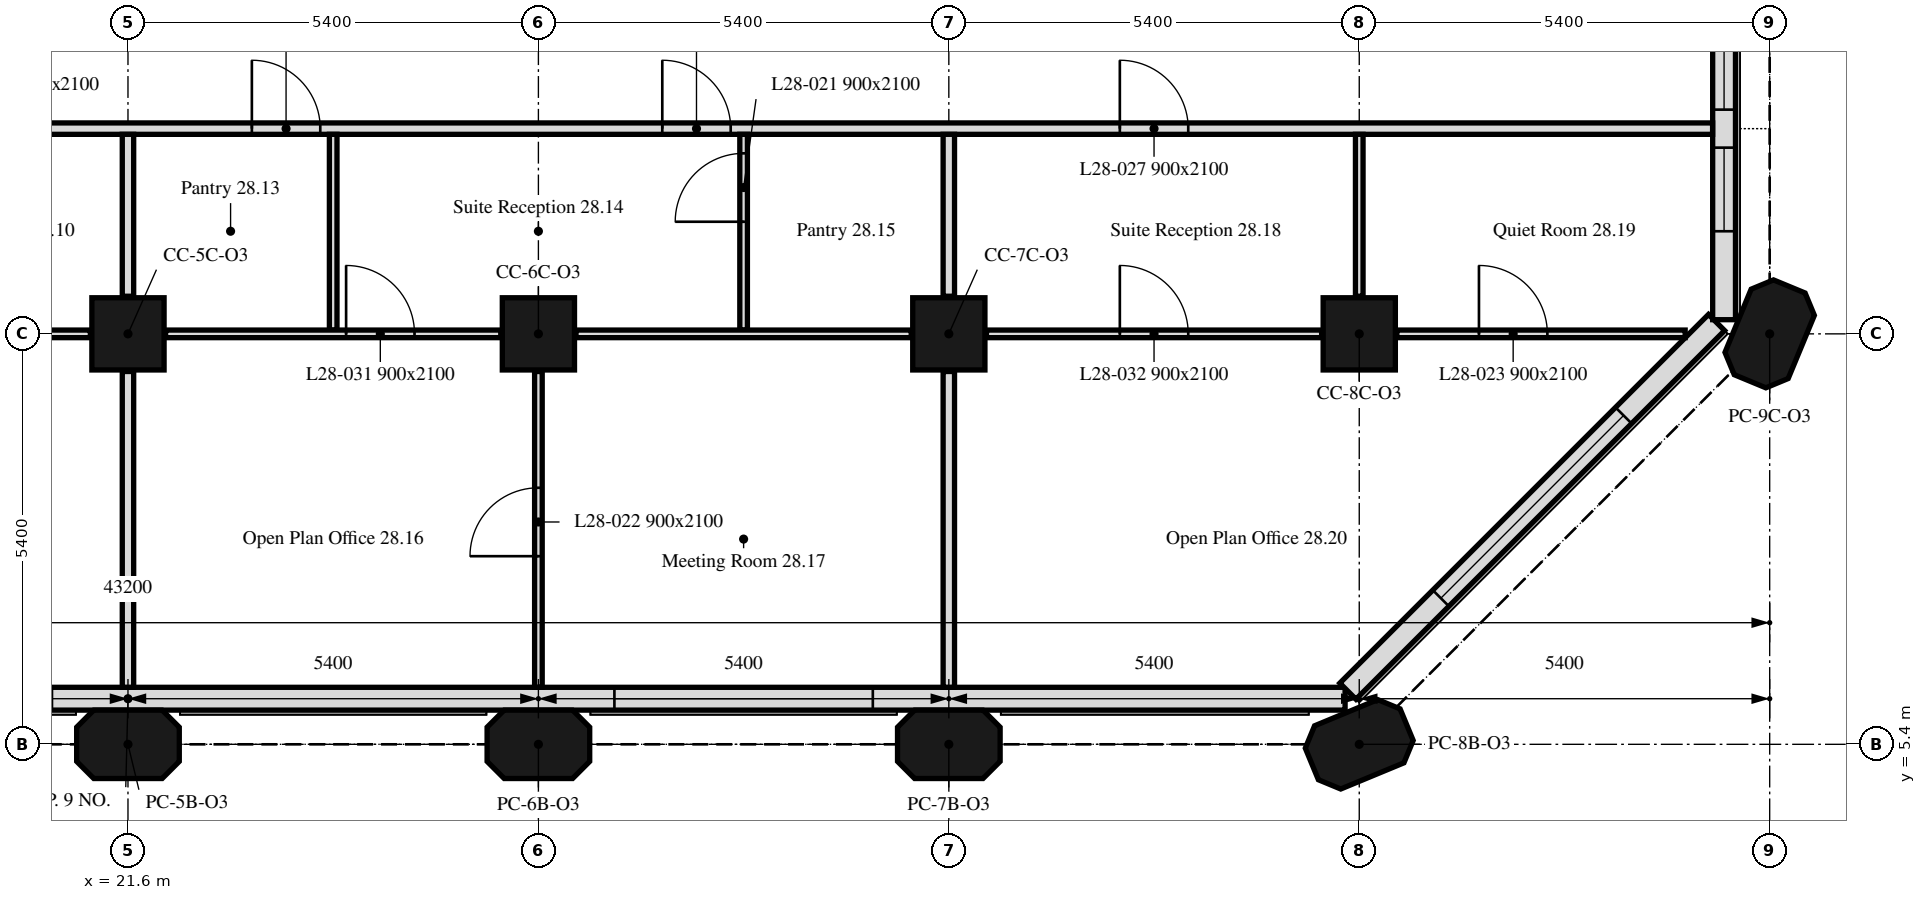
"""IFC4 building model, lengths in metres.
Left out: names, types, materials, properties, quantities, classifications, styles, units other than length and angle.
Written with IfcOpenShell. Run it as: python <this file> out.ifc"""

import sys

from ifc_helpers import new_model, si_unit, direction, frame, frame_2d, origin, origin_2d, place, context, subcontext, project, spatial, polyline, rectangle, outline, extrude, element, fill, save


model = new_model("IFC4")
c1 = context("Model", 3, precision=1e-05, world=origin(), true_north=direction((0.0, 1.0)))
c2 = subcontext(c1, "Body", "Model", "MODEL_VIEW")
j1 = project(units=[si_unit("LENGTHUNIT", "METRE"), si_unit("PLANEANGLEUNIT", "RADIAN")], contexts=[c1])
p1 = place(None, origin())
s1 = spatial("IfcSite", under=j1, at=p1, CompositionType="ELEMENT")
p2 = place(p1, origin())
s2 = spatial("IfcBuilding", under=s1, at=p2, CompositionType="ELEMENT")
p3 = place(p2, frame((0.0, 0.0, 118.2)))
s3 = spatial("IfcBuildingStorey", under=s2, at=p3, CompositionType="ELEMENT", Elevation=118.2)
for number, where, z_axis, x_axis in (
    (1, (21.6, 5.4, 0.0), (0.0, 0.0, 1.0), (1.0, 0.0, 0.0)),
    (2, (27.0, 5.4, 0.0), (0.0, 0.0, 1.0), (1.0, 0.0, 0.0)),
    (3, (32.4, 5.4, 0.0), (0.0, 0.0, 1.0), (1.0, 0.0, 0.0)),
    (4, (37.8, 5.4, 0.0), (0.0, 0.0, 1.0), (0.924, 0.383, 0.0)),
):
    element("IfcColumn", number, at=place(p3, frame(where, z_axis=z_axis, x_axis=x_axis)), inside=s3, PredefinedType="COLUMN", context=c2, shape_type="SweptSolid", body=[
        extrude(outline(polyline([(-0.45, -0.45), (0.45, -0.45), (0.675, -0.225), (0.675, 0.225), (0.45, 0.45), (-0.45, 0.45), (-0.675, 0.225), (-0.675, -0.225), (-0.45, -0.45)])), origin(), (0.0, 0.0, 1.0), 3.5),
    ])
for number, where, z_axis, x_axis in (
    (5, (21.6, 10.8, 0.0), (0.0, 0.0, 1.0), (1.0, 0.0, 0.0)),
    (6, (27.0, 10.8, 0.0), (0.0, 0.0, 1.0), (1.0, 0.0, 0.0)),
    (7, (32.4, 10.8, 0.0), (0.0, 0.0, 1.0), (1.0, 0.0, 0.0)),
    (8, (37.8, 10.8, 0.0), (0.0, 0.0, 1.0), (1.0, 0.0, 0.0)),
):
    element("IfcColumn", number, at=place(p3, frame(where, z_axis=z_axis, x_axis=x_axis)), inside=s3, PredefinedType="COLUMN", context=c2, shape_type="SweptSolid", body=[
        extrude(rectangle(XDim=0.95, YDim=0.95, at=origin_2d()), origin(), (0.0, 0.0, 1.0), 3.5),
    ])
p4 = place(p3, frame((43.2, 10.8, 0.0), z_axis=(0.0, 0.0, 1.0), x_axis=(0.382683432365, 0.923879532511, 0.0)))
e9 = element("IfcColumn", 9, at=p4, inside=s3, PredefinedType="COLUMN", context=c2, shape_type="SweptSolid", body=[
    extrude(outline(polyline([(-0.45, -0.45), (0.45, -0.45), (0.675, -0.225), (0.675, 0.225), (0.45, 0.45), (-0.45, 0.45), (-0.675, 0.225), (-0.675, -0.225), (-0.45, -0.45)])), origin(), (0.0, 0.0, 1.0), 3.5),
])
p5 = place(p3, frame((5.586, 6.0, 0.0), z_axis=(0.0, 0.0, 1.0), x_axis=(1.0, 0.0, 0.0)))
e10 = element("IfcWall", 10, at=p5, inside=s3, PredefinedType="SOLIDWALL", context=c2, shape_type="SweptSolid", body=[
    extrude(rectangle(XDim=32.027, YDim=0.3, at=frame_2d((16.014, 0.0))), origin(), (0.0, 0.0, 1.0), 3.5),
])
p6 = place(p5, frame((0.814, 0.0, 0.9)))
e11 = element("IfcOpeningElement", 11, at=p6, cuts=e10, PredefinedType="OPENING", context=c2, shape_type="SweptSolid", body=[
    extrude(rectangle(XDim=3.4, YDim=1.7, at=frame_2d((1.7, 0.85))), frame((0.0, 0.16, 0.0), z_axis=(0.0, -1.0, 0.0), x_axis=(1.0, 0.0, 0.0)), (0.0, 0.0, 1.0), 0.32),
])
p7 = place(p5, frame((11.614, 0.0, 0.9)))
e12 = element("IfcOpeningElement", 12, at=p7, cuts=e10, PredefinedType="OPENING", context=c2, shape_type="SweptSolid", body=[
    extrude(rectangle(XDim=3.4, YDim=1.7, at=frame_2d((1.7, 0.85))), frame((0.0, 0.16, 0.0), z_axis=(0.0, -1.0, 0.0), x_axis=(1.0, 0.0, 0.0)), (0.0, 0.0, 1.0), 0.32),
])
p8 = place(p5, frame((22.414, 0.0, 0.9)))
e13 = element("IfcOpeningElement", 13, at=p8, cuts=e10, PredefinedType="OPENING", context=c2, shape_type="SweptSolid", body=[
    extrude(rectangle(XDim=3.4, YDim=1.7, at=frame_2d((1.7, 0.85))), frame((0.0, 0.16, 0.0), z_axis=(0.0, -1.0, 0.0), x_axis=(1.0, 0.0, 0.0)), (0.0, 0.0, 1.0), 0.32),
])
p9 = place(p3, frame((37.65, 6.099, 0.0), z_axis=(0.0, 0.0, 1.0), x_axis=(0.707106781187, 0.707106781187, 0.0)))
e14 = element("IfcWall", 14, at=p9, inside=s3, PredefinedType="SOLIDWALL", context=c2, shape_type="SweptSolid", body=[
    extrude(rectangle(XDim=6.86, YDim=0.3, at=frame_2d((3.43, 0.0))), origin(), (0.0, 0.0, 1.0), 3.5),
])
p10 = place(p9, frame((1.73, 0.0, 0.9)))
e15 = element("IfcOpeningElement", 15, at=p10, cuts=e14, PredefinedType="OPENING", context=c2, shape_type="SweptSolid", body=[
    extrude(rectangle(XDim=3.4, YDim=1.7, at=frame_2d((1.7, 0.85))), frame((0.0, 0.16, 0.0), z_axis=(0.0, -1.0, 0.0), x_axis=(1.0, 0.0, 0.0)), (0.0, 0.0, 1.0), 0.32),
])
p11 = place(p3, frame((42.6, 10.986, 0.0), z_axis=(0.0, 0.0, 1.0), x_axis=(0.0, 1.0, 0.0)))
e16 = element("IfcWall", 16, at=p11, inside=s3, PredefinedType="SOLIDWALL", context=c2, shape_type="SweptSolid", body=[
    extrude(rectangle(XDim=5.214, YDim=0.3, at=frame_2d((2.607, 0.0))), origin(), (0.0, 0.0, 1.0), 3.5),
])
p12 = place(p11, frame((1.164, 0.0, 0.9)))
e17 = element("IfcOpeningElement", 17, at=p12, cuts=e16, PredefinedType="OPENING", context=c2, shape_type="SweptSolid", body=[
    extrude(rectangle(XDim=1.1, YDim=1.7, at=frame_2d((0.55, 0.85))), frame((0.0, 0.16, 0.0), z_axis=(0.0, -1.0, 0.0), x_axis=(1.0, 0.0, 0.0)), (0.0, 0.0, 1.0), 0.32),
])
p13 = place(p11, frame((2.764, 0.0, 0.9)))
e18 = element("IfcOpeningElement", 18, at=p13, cuts=e16, PredefinedType="OPENING", context=c2, shape_type="SweptSolid", body=[
    extrude(rectangle(XDim=1.1, YDim=1.7, at=frame_2d((0.55, 0.85))), frame((0.0, 0.16, 0.0), z_axis=(0.0, -1.0, 0.0), x_axis=(1.0, 0.0, 0.0)), (0.0, 0.0, 1.0), 0.32),
])
p14 = place(p3, frame((0.751, 13.5, 0.0), z_axis=(0.0, 0.0, 1.0), x_axis=(1.0, 0.0, 0.0)))
e19 = element("IfcWall", 19, at=p14, inside=s3, PredefinedType="PARTITIONING", context=c2, shape_type="SweptSolid", body=[
    extrude(rectangle(XDim=41.698, YDim=0.15, at=frame_2d((20.849, 0.0))), origin(), (0.0, 0.0, 1.0), 3.5),
])
p15 = place(p14, frame((0.879, 0.0, 0.0)))
e20 = element("IfcOpeningElement", 20, at=p15, cuts=e19, PredefinedType="OPENING", context=c2, shape_type="SweptSolid", body=[
    extrude(rectangle(XDim=0.9, YDim=2.1, at=frame_2d((0.45, 1.05))), frame((0.0, 0.075, 0.0), z_axis=(0.0, -1.0, 0.0), x_axis=(1.0, 0.0, 0.0)), (0.0, 0.0, 1.0), 0.15),
])
p16 = place(p14, frame((7.519, 0.0, 0.0)))
e21 = element("IfcOpeningElement", 21, at=p16, cuts=e19, PredefinedType="OPENING", context=c2, shape_type="SweptSolid", body=[
    extrude(rectangle(XDim=0.9, YDim=2.1, at=frame_2d((0.45, 1.05))), frame((0.0, 0.075, 0.0), z_axis=(0.0, -1.0, 0.0), x_axis=(1.0, 0.0, 0.0)), (0.0, 0.0, 1.0), 0.15),
])
p17 = place(p14, frame((11.679, 0.0, 0.0)))
e22 = element("IfcOpeningElement", 22, at=p17, cuts=e19, PredefinedType="OPENING", context=c2, shape_type="SweptSolid", body=[
    extrude(rectangle(XDim=0.9, YDim=2.1, at=frame_2d((0.45, 1.05))), frame((0.0, 0.075, 0.0), z_axis=(0.0, -1.0, 0.0), x_axis=(1.0, 0.0, 0.0)), (0.0, 0.0, 1.0), 0.15),
])
p18 = place(p14, frame((22.479, 0.0, 0.0)))
e23 = element("IfcOpeningElement", 23, at=p18, cuts=e19, PredefinedType="OPENING", context=c2, shape_type="SweptSolid", body=[
    extrude(rectangle(XDim=0.9, YDim=2.1, at=frame_2d((0.45, 1.05))), frame((0.0, 0.075, 0.0), z_axis=(0.0, -1.0, 0.0), x_axis=(1.0, 0.0, 0.0)), (0.0, 0.0, 1.0), 0.15),
])
p19 = place(p14, frame((33.899, 0.0, 0.0)))
e24 = element("IfcOpeningElement", 24, at=p19, cuts=e19, PredefinedType="OPENING", context=c2, shape_type="SweptSolid", body=[
    extrude(rectangle(XDim=0.9, YDim=2.1, at=frame_2d((0.45, 1.05))), frame((0.0, 0.075, 0.0), z_axis=(0.0, -1.0, 0.0), x_axis=(1.0, 0.0, 0.0)), (0.0, 0.0, 1.0), 0.15),
])
p20 = place(p14, frame((17.079, 0.0, 0.0)))
e25 = element("IfcOpeningElement", 25, at=p20, cuts=e19, PredefinedType="OPENING", context=c2, shape_type="SweptSolid", body=[
    extrude(rectangle(XDim=0.9, YDim=2.1, at=frame_2d((0.45, 1.05))), frame((0.0, 0.075, 0.0), z_axis=(0.0, -1.0, 0.0), x_axis=(1.0, 0.0, 0.0)), (0.0, 0.0, 1.0), 0.15),
])
p21 = place(p14, frame((27.879, 0.0, 0.0)))
e26 = element("IfcOpeningElement", 26, at=p21, cuts=e19, PredefinedType="OPENING", context=c2, shape_type="SweptSolid", body=[
    extrude(rectangle(XDim=0.9, YDim=2.1, at=frame_2d((0.45, 1.05))), frame((0.0, 0.075, 0.0), z_axis=(0.0, -1.0, 0.0), x_axis=(1.0, 0.0, 0.0)), (0.0, 0.0, 1.0), 0.15),
])
p22 = place(p3, frame((16.695, 10.8, 0.0), z_axis=(0.0, 0.0, 1.0), x_axis=(1.0, 0.0, 0.0)))
e27 = element("IfcWall", 27, at=p22, inside=s3, PredefinedType="PARTITIONING", context=c2, shape_type="SweptSolid", body=[
    extrude(rectangle(XDim=4.41, YDim=0.1, at=frame_2d((2.205, 0.0))), origin(), (0.0, 0.0, 1.0), 3.5),
])
p23 = place(p3, frame((21.6, 11.295, 0.0), z_axis=(0.0, 0.0, 1.0), x_axis=(0.0, 1.0, 0.0)))
e28 = element("IfcWall", 28, at=p23, inside=s3, PredefinedType="PARTITIONING", context=c2, shape_type="SweptSolid", body=[
    extrude(rectangle(XDim=2.13, YDim=0.15, at=frame_2d((1.065, 0.0))), origin(), (0.0, 0.0, 1.0), 3.5),
])
p24 = place(p3, frame((21.6, 6.151, 0.0), z_axis=(0.0, 0.0, 1.0), x_axis=(0.0, 1.0, 0.0)))
e29 = element("IfcWall", 29, at=p24, inside=s3, PredefinedType="PARTITIONING", context=c2, shape_type="SweptSolid", body=[
    extrude(rectangle(XDim=4.154, YDim=0.15, at=frame_2d((2.077, 0.0))), origin(), (0.0, 0.0, 1.0), 3.5),
])
p25 = place(p3, frame((24.3, 10.85, 0.0), z_axis=(0.0, 0.0, 1.0), x_axis=(0.0, 1.0, 0.0)))
e30 = element("IfcWall", 30, at=p25, inside=s3, PredefinedType="PARTITIONING", context=c2, shape_type="SweptSolid", body=[
    extrude(rectangle(XDim=2.575, YDim=0.1, at=frame_2d((1.288, 0.0))), origin(), (0.0, 0.0, 1.0), 3.5),
])
p26 = place(p3, frame((22.095, 10.8, 0.0), z_axis=(0.0, 0.0, 1.0), x_axis=(1.0, 0.0, 0.0)))
e31 = element("IfcWall", 31, at=p26, inside=s3, PredefinedType="PARTITIONING", context=c2, shape_type="SweptSolid", body=[
    extrude(rectangle(XDim=4.41, YDim=0.1, at=frame_2d((2.205, 0.0))), origin(), (0.0, 0.0, 1.0), 3.5),
])
p27 = place(p26, frame((2.375, 0.0, 0.0)))
e32 = element("IfcOpeningElement", 32, at=p27, cuts=e31, PredefinedType="OPENING", context=c2, shape_type="SweptSolid", body=[
    extrude(rectangle(XDim=0.9, YDim=2.1, at=frame_2d((0.45, 1.05))), frame((0.0, 0.05, 0.0), z_axis=(0.0, -1.0, 0.0), x_axis=(1.0, 0.0, 0.0)), (0.0, 0.0, 1.0), 0.1),
])
p28 = place(p3, frame((29.7, 10.85, 0.0), z_axis=(0.0, 0.0, 1.0), x_axis=(0.0, 1.0, 0.0)))
e33 = element("IfcWall", 33, at=p28, inside=s3, PredefinedType="PARTITIONING", context=c2, shape_type="SweptSolid", body=[
    extrude(rectangle(XDim=2.575, YDim=0.1, at=frame_2d((1.288, 0.0))), origin(), (0.0, 0.0, 1.0), 3.5),
])
p29 = place(p28, frame((1.425, 0.0, 0.0)))
e34 = element("IfcOpeningElement", 34, at=p29, cuts=e33, PredefinedType="OPENING", context=c2, shape_type="SweptSolid", body=[
    extrude(rectangle(XDim=0.9, YDim=2.1, at=frame_2d((0.45, 1.05))), frame((0.0, 0.05, 0.0), z_axis=(0.0, -1.0, 0.0), x_axis=(1.0, 0.0, 0.0)), (0.0, 0.0, 1.0), 0.1),
])
p30 = place(p3, frame((27.495, 10.8, 0.0), z_axis=(0.0, 0.0, 1.0), x_axis=(1.0, 0.0, 0.0)))
e35 = element("IfcWall", 35, at=p30, inside=s3, PredefinedType="PARTITIONING", context=c2, shape_type="SweptSolid", body=[
    extrude(rectangle(XDim=4.41, YDim=0.1, at=frame_2d((2.205, 0.0))), origin(), (0.0, 0.0, 1.0), 3.5),
])
p31 = place(p3, frame((32.4, 11.295, 0.0), z_axis=(0.0, 0.0, 1.0), x_axis=(0.0, 1.0, 0.0)))
e36 = element("IfcWall", 36, at=p31, inside=s3, PredefinedType="PARTITIONING", context=c2, shape_type="SweptSolid", body=[
    extrude(rectangle(XDim=2.13, YDim=0.15, at=frame_2d((1.065, 0.0))), origin(), (0.0, 0.0, 1.0), 3.5),
])
p32 = place(p3, frame((27.0, 6.151, 0.0), z_axis=(0.0, 0.0, 1.0), x_axis=(0.0, 1.0, 0.0)))
e37 = element("IfcWall", 37, at=p32, inside=s3, PredefinedType="PARTITIONING", context=c2, shape_type="SweptSolid", body=[
    extrude(rectangle(XDim=4.154, YDim=0.1, at=frame_2d((2.077, 0.0))), origin(), (0.0, 0.0, 1.0), 3.5),
])
p33 = place(p32, frame((1.724, 0.0, 0.0)))
e38 = element("IfcOpeningElement", 38, at=p33, cuts=e37, PredefinedType="OPENING", context=c2, shape_type="SweptSolid", body=[
    extrude(rectangle(XDim=0.9, YDim=2.1, at=frame_2d((0.45, 1.05))), frame((0.0, 0.05, 0.0), z_axis=(0.0, -1.0, 0.0), x_axis=(1.0, 0.0, 0.0)), (0.0, 0.0, 1.0), 0.1),
])
p34 = place(p3, frame((32.4, 6.151, 0.0), z_axis=(0.0, 0.0, 1.0), x_axis=(0.0, 1.0, 0.0)))
e39 = element("IfcWall", 39, at=p34, inside=s3, PredefinedType="PARTITIONING", context=c2, shape_type="SweptSolid", body=[
    extrude(rectangle(XDim=4.154, YDim=0.15, at=frame_2d((2.077, 0.0))), origin(), (0.0, 0.0, 1.0), 3.5),
])
p35 = place(p3, frame((32.895, 10.8, 0.0), z_axis=(0.0, 0.0, 1.0), x_axis=(1.0, 0.0, 0.0)))
e40 = element("IfcWall", 40, at=p35, inside=s3, PredefinedType="PARTITIONING", context=c2, shape_type="SweptSolid", body=[
    extrude(rectangle(XDim=4.41, YDim=0.1, at=frame_2d((2.205, 0.0))), origin(), (0.0, 0.0, 1.0), 3.5),
])
p36 = place(p35, frame((1.755, 0.0, 0.0)))
e41 = element("IfcOpeningElement", 41, at=p36, cuts=e40, PredefinedType="OPENING", context=c2, shape_type="SweptSolid", body=[
    extrude(rectangle(XDim=0.9, YDim=2.1, at=frame_2d((0.45, 1.05))), frame((0.0, 0.05, 0.0), z_axis=(0.0, -1.0, 0.0), x_axis=(1.0, 0.0, 0.0)), (0.0, 0.0, 1.0), 0.1),
])
p37 = place(p3, frame((37.8, 11.295, 0.0), z_axis=(0.0, 0.0, 1.0), x_axis=(0.0, 1.0, 0.0)))
e42 = element("IfcWall", 42, at=p37, inside=s3, PredefinedType="PARTITIONING", context=c2, shape_type="SweptSolid", body=[
    extrude(rectangle(XDim=2.13, YDim=0.1, at=frame_2d((1.065, 0.0))), origin(), (0.0, 0.0, 1.0), 3.5),
])
p38 = place(p3, frame((38.295, 10.8, 0.0), z_axis=(0.0, 0.0, 1.0), x_axis=(1.0, 0.0, 0.0)))
e43 = element("IfcWall", 43, at=p38, inside=s3, PredefinedType="PARTITIONING", context=c2, shape_type="SweptSolid", body=[
    extrude(rectangle(XDim=3.793, YDim=0.1, at=frame_2d((1.896, 0.0))), origin(), (0.0, 0.0, 1.0), 3.5),
])
p39 = place(p38, frame((1.08, 0.0, 0.0)))
e44 = element("IfcOpeningElement", 44, at=p39, cuts=e43, PredefinedType="OPENING", context=c2, shape_type="SweptSolid", body=[
    extrude(rectangle(XDim=0.9, YDim=2.1, at=frame_2d((0.45, 1.05))), frame((0.0, 0.05, 0.0), z_axis=(0.0, -1.0, 0.0), x_axis=(1.0, 0.0, 0.0)), (0.0, 0.0, 1.0), 0.1),
])
p40 = place(p8, origin())
e45 = element("IfcWindow", 45, at=p40, inside=s3, PartitioningType="SINGLE_PANEL", PredefinedType="WINDOW", context=c2, shape_type="SweptSolid", body=[
    extrude(rectangle(XDim=3.4, YDim=1.7, at=frame_2d((1.7, 0.85))), frame((0.0, 0.03, 0.0), z_axis=(0.0, -1.0, 0.0), x_axis=(1.0, 0.0, 0.0)), (0.0, 0.0, 1.0), 0.06),
])
fill(e13, e45)
p41 = place(p10, origin())
e46 = element("IfcWindow", 46, at=p41, inside=s3, PartitioningType="SINGLE_PANEL", PredefinedType="WINDOW", context=c2, shape_type="SweptSolid", body=[
    extrude(rectangle(XDim=3.4, YDim=1.7, at=frame_2d((1.7, 0.85))), frame((0.0, 0.03, 0.0), z_axis=(0.0, -1.0, 0.0), x_axis=(1.0, 0.0, 0.0)), (0.0, 0.0, 1.0), 0.06),
])
fill(e15, e46)
p42 = place(p12, origin())
e47 = element("IfcWindow", 47, at=p42, inside=s3, PartitioningType="SINGLE_PANEL", PredefinedType="WINDOW", context=c2, shape_type="SweptSolid", body=[
    extrude(rectangle(XDim=1.1, YDim=1.7, at=frame_2d((0.55, 0.85))), frame((0.0, 0.03, 0.0), z_axis=(0.0, -1.0, 0.0), x_axis=(1.0, 0.0, 0.0)), (0.0, 0.0, 1.0), 0.06),
])
fill(e17, e47)
p43 = place(p13, origin())
e48 = element("IfcWindow", 48, at=p43, inside=s3, PartitioningType="SINGLE_PANEL", PredefinedType="WINDOW", context=c2, shape_type="SweptSolid", body=[
    extrude(rectangle(XDim=1.1, YDim=1.7, at=frame_2d((0.55, 0.85))), frame((0.0, 0.03, 0.0), z_axis=(0.0, -1.0, 0.0), x_axis=(1.0, 0.0, 0.0)), (0.0, 0.0, 1.0), 0.06),
])
fill(e18, e48)
p44 = place(p18, origin())
e49 = element("IfcDoor", 49, at=p44, inside=s3, OperationType="SINGLE_SWING_LEFT", PredefinedType="DOOR", context=c2, shape_type="SweptSolid", body=[
    extrude(rectangle(XDim=0.9, YDim=2.1, at=frame_2d((0.45, 1.05))), frame((0.0, 0.025, 0.0), z_axis=(0.0, -1.0, 0.0), x_axis=(1.0, 0.0, 0.0)), (0.0, 0.0, 1.0), 0.05),
])
fill(e23, e49)
p45 = place(p29, origin())
e50 = element("IfcDoor", 50, at=p45, inside=s3, OperationType="SINGLE_SWING_RIGHT", PredefinedType="DOOR", context=c2, shape_type="SweptSolid", body=[
    extrude(rectangle(XDim=0.9, YDim=2.1, at=frame_2d((0.45, 1.05))), frame((0.0, 0.025, 0.0), z_axis=(0.0, -1.0, 0.0), x_axis=(1.0, 0.0, 0.0)), (0.0, 0.0, 1.0), 0.05),
])
fill(e34, e50)
p46 = place(p33, origin())
e51 = element("IfcDoor", 51, at=p46, inside=s3, OperationType="SINGLE_SWING_RIGHT", PredefinedType="DOOR", context=c2, shape_type="SweptSolid", body=[
    extrude(rectangle(XDim=0.9, YDim=2.1, at=frame_2d((0.45, 1.05))), frame((0.0, 0.025, 0.0), z_axis=(0.0, -1.0, 0.0), x_axis=(1.0, 0.0, 0.0)), (0.0, 0.0, 1.0), 0.05),
])
fill(e38, e51)
p47 = place(p39, origin())
e52 = element("IfcDoor", 52, at=p47, inside=s3, OperationType="SINGLE_SWING_RIGHT", PredefinedType="DOOR", context=c2, shape_type="SweptSolid", body=[
    extrude(rectangle(XDim=0.9, YDim=2.1, at=frame_2d((0.45, 1.05))), frame((0.0, 0.025, 0.0), z_axis=(0.0, -1.0, 0.0), x_axis=(1.0, 0.0, 0.0)), (0.0, 0.0, 1.0), 0.05),
])
fill(e44, e52)
p48 = place(p19, origin())
e53 = element("IfcDoor", 53, at=p48, inside=s3, OperationType="SINGLE_SWING_LEFT", PredefinedType="DOOR", context=c2, shape_type="SweptSolid", body=[
    extrude(rectangle(XDim=0.9, YDim=2.1, at=frame_2d((0.45, 1.05))), frame((0.0, 0.025, 0.0), z_axis=(0.0, -1.0, 0.0), x_axis=(1.0, 0.0, 0.0)), (0.0, 0.0, 1.0), 0.05),
])
fill(e24, e53)
p49 = place(p27, origin())
e54 = element("IfcDoor", 54, at=p49, inside=s3, OperationType="SINGLE_SWING_LEFT", PredefinedType="DOOR", context=c2, shape_type="SweptSolid", body=[
    extrude(rectangle(XDim=0.9, YDim=2.1, at=frame_2d((0.45, 1.05))), frame((0.0, 0.025, 0.0), z_axis=(0.0, -1.0, 0.0), x_axis=(1.0, 0.0, 0.0)), (0.0, 0.0, 1.0), 0.05),
])
fill(e32, e54)
p50 = place(p36, origin())
e55 = element("IfcDoor", 55, at=p50, inside=s3, OperationType="SINGLE_SWING_LEFT", PredefinedType="DOOR", context=c2, shape_type="SweptSolid", body=[
    extrude(rectangle(XDim=0.9, YDim=2.1, at=frame_2d((0.45, 1.05))), frame((0.0, 0.025, 0.0), z_axis=(0.0, -1.0, 0.0), x_axis=(1.0, 0.0, 0.0)), (0.0, 0.0, 1.0), 0.05),
])
fill(e41, e55)
p51 = place(p21, origin())
e56 = element("IfcDoor", 56, at=p51, inside=s3, OperationType="SINGLE_SWING_LEFT", PredefinedType="DOOR", context=c2, shape_type="SweptSolid", body=[
    extrude(rectangle(XDim=0.9, YDim=2.1, at=frame_2d((0.45, 1.05))), frame((0.0, 0.025, 0.0), z_axis=(0.0, -1.0, 0.0), x_axis=(1.0, 0.0, 0.0)), (0.0, 0.0, 1.0), 0.05),
])
fill(e26, e56)
save(model, sys.argv[1])
